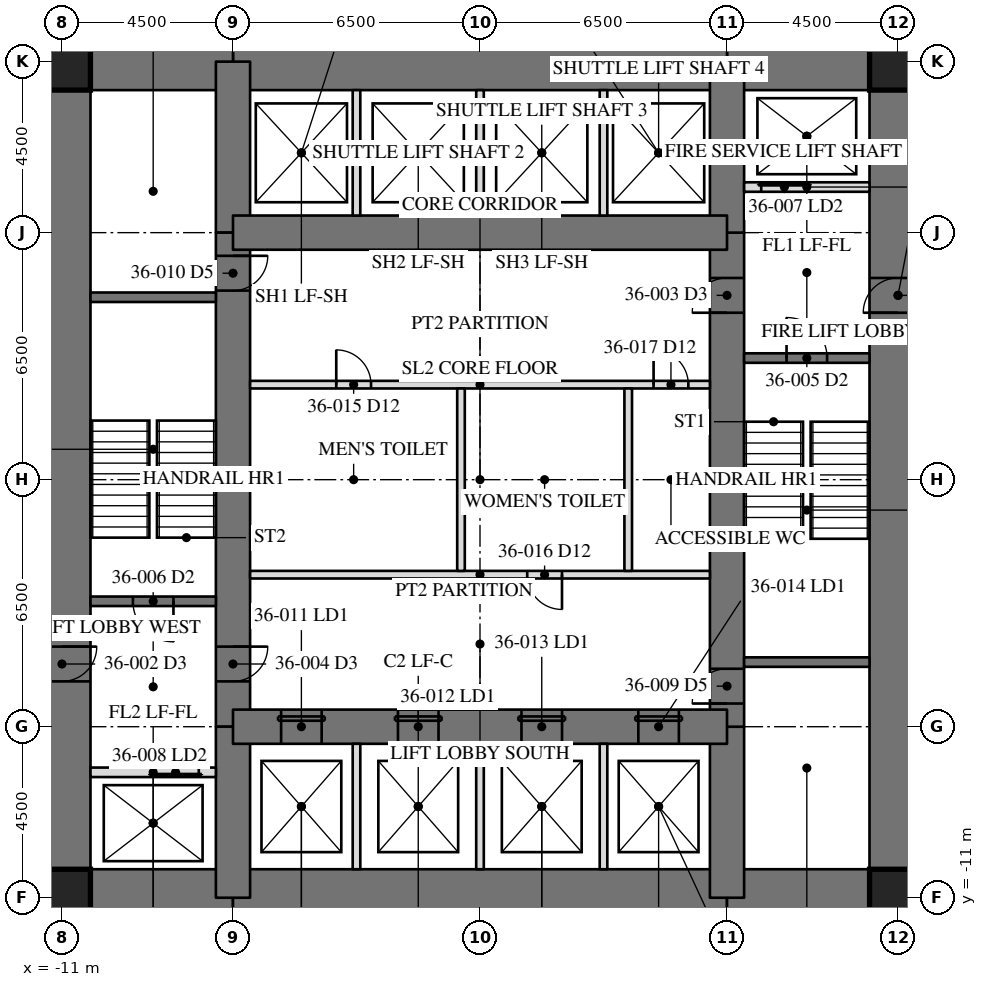
"""IFC4 building model, lengths in metres.
Left out: names, types, materials, properties, quantities, classifications, styles, units other than length and angle.
Written with IfcOpenShell. Run it as: python <this file> out.ifc"""

import sys

from ifc_helpers import new_model, si_unit, direction, frame, frame_2d, origin, origin_2d, place, context, subcontext, project, spatial, rectangle, hollow_rectangle, extrude, element, fill, save


model = new_model("IFC4")
c1 = context("Model", 3, precision=1e-05, world=origin(), true_north=direction((0.0, 1.0)))
c2 = subcontext(c1, "Body", "Model", "MODEL_VIEW")
j1 = project(units=[si_unit("LENGTHUNIT", "METRE"), si_unit("PLANEANGLEUNIT", "RADIAN")], contexts=[c1])
p1 = place(None, origin())
s1 = spatial("IfcSite", under=j1, at=p1, CompositionType="ELEMENT")
p2 = place(p1, origin())
s2 = spatial("IfcBuilding", under=s1, at=p2, CompositionType="ELEMENT")
p3 = place(p2, frame((0.0, 0.0, 154.1)))
s3 = spatial("IfcBuildingStorey", under=s2, at=p3, CompositionType="ELEMENT", Elevation=154.1)
p4 = place(p3, frame((11.0, -11.0, 0.0), z_axis=(0.0, 0.0, 1.0), x_axis=(0.0, 1.0, 0.0)))
e1 = element("IfcWall", 1, at=p4, inside=s3, PredefinedType="SHEAR", context=c2, shape_type="SweptSolid", body=[
    extrude(rectangle(XDim=22.0, YDim=1.5, at=frame_2d((11.0, 0.0))), origin(), (0.0, 0.0, 1.0), 4.1),
])
p5 = place(p4, frame((15.393, 0.0, 0.0)))
e2 = element("IfcOpeningElement", 2, at=p5, cuts=e1, PredefinedType="OPENING", context=c2, shape_type="SweptSolid", body=[
    extrude(rectangle(XDim=0.915, YDim=2.134, at=frame_2d((0.458, 1.067))), frame((0.0, 0.76, 0.0), z_axis=(0.0, -1.0, 0.0), x_axis=(1.0, 0.0, 0.0)), (0.0, 0.0, 1.0), 1.52),
])
p6 = place(p3, frame((-11.0, 11.0, 0.0), z_axis=(0.0, 0.0, 1.0), x_axis=(0.0, -1.0, 0.0)))
e3 = element("IfcWall", 3, at=p6, inside=s3, PredefinedType="SHEAR", context=c2, shape_type="SweptSolid", body=[
    extrude(rectangle(XDim=22.0, YDim=1.5, at=frame_2d((11.0, 0.0))), origin(), (0.0, 0.0, 1.0), 4.1),
])
p7 = place(p6, frame((15.393, 0.0, 0.0)))
e4 = element("IfcOpeningElement", 4, at=p7, cuts=e3, PredefinedType="OPENING", context=c2, shape_type="SweptSolid", body=[
    extrude(rectangle(XDim=0.915, YDim=2.134, at=frame_2d((0.458, 1.067))), frame((0.0, 0.76, 0.0), z_axis=(0.0, -1.0, 0.0), x_axis=(1.0, 0.0, 0.0)), (0.0, 0.0, 1.0), 1.52),
])
p8 = place(p3, frame((11.0, 11.0, 0.0), z_axis=(0.0, 0.0, 1.0), x_axis=(-1.0, 0.0, 0.0)))
e5 = element("IfcWall", 5, at=p8, inside=s3, PredefinedType="SHEAR", context=c2, shape_type="SweptSolid", body=[
    extrude(rectangle(XDim=4.5, YDim=1.5, at=frame_2d((2.25, 0.0))), origin(), (0.0, 0.0, 1.0), 4.1),
])
p9 = place(p3, frame((6.5, 11.0, 0.0), z_axis=(0.0, 0.0, 1.0), x_axis=(-1.0, 0.0, 0.0)))
e6 = element("IfcWall", 6, at=p9, inside=s3, PredefinedType="SHEAR", context=c2, shape_type="SweptSolid", body=[
    extrude(rectangle(XDim=13.0, YDim=1.5, at=frame_2d((6.5, 0.0))), origin(), (0.0, 0.0, 1.0), 4.1),
])
for number, where, z_axis, x_axis in (
    (7, (-6.5, 11.0, 0.0), (0.0, 0.0, 1.0), (-1.0, 0.0, 0.0)),
    (8, (-11.0, -11.0, 0.0), (0.0, 0.0, 1.0), (1.0, 0.0, 0.0)),
):
    element("IfcWall", number, at=place(p3, frame(where, z_axis=z_axis, x_axis=x_axis)), inside=s3, PredefinedType="SHEAR", context=c2, shape_type="SweptSolid", body=[
        extrude(rectangle(XDim=4.5, YDim=1.5, at=frame_2d((2.25, 0.0))), origin(), (0.0, 0.0, 1.0), 4.1),
    ])
p10 = place(p3, frame((-6.5, -11.0, 0.0), z_axis=(0.0, 0.0, 1.0), x_axis=(1.0, 0.0, 0.0)))
e9 = element("IfcWall", 9, at=p10, inside=s3, PredefinedType="SHEAR", context=c2, shape_type="SweptSolid", body=[
    extrude(rectangle(XDim=13.0, YDim=1.5, at=frame_2d((6.5, 0.0))), origin(), (0.0, 0.0, 1.0), 4.1),
])
p11 = place(p3, frame((6.5, -11.0, 0.0), z_axis=(0.0, 0.0, 1.0), x_axis=(1.0, 0.0, 0.0)))
e10 = element("IfcWall", 10, at=p11, inside=s3, PredefinedType="SHEAR", context=c2, shape_type="SweptSolid", body=[
    extrude(rectangle(XDim=4.5, YDim=1.5, at=frame_2d((2.25, 0.0))), origin(), (0.0, 0.0, 1.0), 4.1),
])
p12 = place(p3, frame((6.5, -11.0, 0.0), z_axis=(0.0, 0.0, 1.0), x_axis=(0.0, 1.0, 0.0)))
e11 = element("IfcWall", 11, at=p12, inside=s3, PredefinedType="SHEAR", context=c2, shape_type="SweptSolid", body=[
    extrude(rectangle(XDim=4.5, YDim=0.9, at=frame_2d((2.25, 0.0))), origin(), (0.0, 0.0, 1.0), 4.1),
])
p13 = place(p3, frame((6.5, -6.5, 0.0), z_axis=(0.0, 0.0, 1.0), x_axis=(0.0, 1.0, 0.0)))
e12 = element("IfcWall", 12, at=p13, inside=s3, PredefinedType="SHEAR", context=c2, shape_type="SweptSolid", body=[
    extrude(rectangle(XDim=13.0, YDim=0.9, at=frame_2d((6.5, 0.0))), origin(), (0.0, 0.0, 1.0), 4.1),
])
p14 = place(p13, frame((10.893, 0.0, 0.0)))
e13 = element("IfcOpeningElement", 13, at=p14, cuts=e12, PredefinedType="OPENING", context=c2, shape_type="SweptSolid", body=[
    extrude(rectangle(XDim=0.915, YDim=2.134, at=frame_2d((0.458, 1.067))), frame((0.0, 0.46, 0.0), z_axis=(0.0, -1.0, 0.0), x_axis=(1.0, 0.0, 0.0)), (0.0, 0.0, 1.0), 0.92),
])
p15 = place(p13, frame((0.61, 0.0, 0.0)))
e14 = element("IfcOpeningElement", 14, at=p15, cuts=e12, PredefinedType="OPENING", context=c2, shape_type="SweptSolid", body=[
    extrude(rectangle(XDim=0.915, YDim=2.134, at=frame_2d((0.458, 1.067))), frame((0.0, 0.46, 0.0), z_axis=(0.0, -1.0, 0.0), x_axis=(1.0, 0.0, 0.0)), (0.0, 0.0, 1.0), 0.92),
])
for number, where, z_axis, x_axis in (
    (15, (6.5, 6.5, 0.0), (0.0, 0.0, 1.0), (0.0, 1.0, 0.0)),
    (16, (-6.5, 11.0, 0.0), (0.0, 0.0, 1.0), (0.0, -1.0, 0.0)),
):
    element("IfcWall", number, at=place(p3, frame(where, z_axis=z_axis, x_axis=x_axis)), inside=s3, PredefinedType="SHEAR", context=c2, shape_type="SweptSolid", body=[
        extrude(rectangle(XDim=4.5, YDim=0.9, at=frame_2d((2.25, 0.0))), origin(), (0.0, 0.0, 1.0), 4.1),
    ])
p16 = place(p3, frame((-6.5, 6.5, 0.0), z_axis=(0.0, 0.0, 1.0), x_axis=(0.0, -1.0, 0.0)))
e17 = element("IfcWall", 17, at=p16, inside=s3, PredefinedType="SHEAR", context=c2, shape_type="SweptSolid", body=[
    extrude(rectangle(XDim=13.0, YDim=0.9, at=frame_2d((6.5, 0.0))), origin(), (0.0, 0.0, 1.0), 4.1),
])
p17 = place(p16, frame((10.893, 0.0, 0.0)))
e18 = element("IfcOpeningElement", 18, at=p17, cuts=e17, PredefinedType="OPENING", context=c2, shape_type="SweptSolid", body=[
    extrude(rectangle(XDim=0.915, YDim=2.134, at=frame_2d((0.458, 1.067))), frame((0.0, 0.46, 0.0), z_axis=(0.0, -1.0, 0.0), x_axis=(1.0, 0.0, 0.0)), (0.0, 0.0, 1.0), 0.92),
])
p18 = place(p16, frame((0.61, 0.0, 0.0)))
e19 = element("IfcOpeningElement", 19, at=p18, cuts=e17, PredefinedType="OPENING", context=c2, shape_type="SweptSolid", body=[
    extrude(rectangle(XDim=0.915, YDim=2.134, at=frame_2d((0.458, 1.067))), frame((0.0, 0.46, 0.0), z_axis=(0.0, -1.0, 0.0), x_axis=(1.0, 0.0, 0.0)), (0.0, 0.0, 1.0), 0.92),
])
p19 = place(p3, frame((-6.5, -6.5, 0.0), z_axis=(0.0, 0.0, 1.0), x_axis=(0.0, -1.0, 0.0)))
e20 = element("IfcWall", 20, at=p19, inside=s3, PredefinedType="SHEAR", context=c2, shape_type="SweptSolid", body=[
    extrude(rectangle(XDim=4.5, YDim=0.9, at=frame_2d((2.25, 0.0))), origin(), (0.0, 0.0, 1.0), 4.1),
])
p20 = place(p3, frame((6.5, 6.5, 0.0), z_axis=(0.0, 0.0, 1.0), x_axis=(-1.0, 0.0, 0.0)))
e21 = element("IfcWall", 21, at=p20, inside=s3, PredefinedType="SHEAR", context=c2, shape_type="SweptSolid", body=[
    extrude(rectangle(XDim=13.0, YDim=0.9, at=frame_2d((6.5, 0.0))), origin(), (0.0, 0.0, 1.0), 4.1),
])
p21 = place(p3, frame((-6.5, -6.5, 0.0), z_axis=(0.0, 0.0, 1.0), x_axis=(1.0, 0.0, 0.0)))
e22 = element("IfcWall", 22, at=p21, inside=s3, PredefinedType="SHEAR", context=c2, shape_type="SweptSolid", body=[
    extrude(rectangle(XDim=13.0, YDim=0.9, at=frame_2d((6.5, 0.0))), origin(), (0.0, 0.0, 1.0), 4.1),
])
p22 = place(p21, frame((1.267, 0.0, 0.0)))
e23 = element("IfcOpeningElement", 23, at=p22, cuts=e22, PredefinedType="OPENING", context=c2, shape_type="SweptSolid", body=[
    extrude(rectangle(XDim=1.067, YDim=2.134, at=frame_2d((0.533, 1.067))), frame((0.0, 0.46, 0.0), z_axis=(0.0, -1.0, 0.0), x_axis=(1.0, 0.0, 0.0)), (0.0, 0.0, 1.0), 0.92),
])
p23 = place(p21, frame((4.342, 0.0, 0.0)))
e24 = element("IfcOpeningElement", 24, at=p23, cuts=e22, PredefinedType="OPENING", context=c2, shape_type="SweptSolid", body=[
    extrude(rectangle(XDim=1.067, YDim=2.134, at=frame_2d((0.533, 1.067))), frame((0.0, 0.46, 0.0), z_axis=(0.0, -1.0, 0.0), x_axis=(1.0, 0.0, 0.0)), (0.0, 0.0, 1.0), 0.92),
])
p24 = place(p21, frame((7.592, 0.0, 0.0)))
e25 = element("IfcOpeningElement", 25, at=p24, cuts=e22, PredefinedType="OPENING", context=c2, shape_type="SweptSolid", body=[
    extrude(rectangle(XDim=1.067, YDim=2.134, at=frame_2d((0.533, 1.067))), frame((0.0, 0.46, 0.0), z_axis=(0.0, -1.0, 0.0), x_axis=(1.0, 0.0, 0.0)), (0.0, 0.0, 1.0), 0.92),
])
p25 = place(p21, frame((10.667, 0.0, 0.0)))
e26 = element("IfcOpeningElement", 26, at=p25, cuts=e22, PredefinedType="OPENING", context=c2, shape_type="SweptSolid", body=[
    extrude(rectangle(XDim=1.067, YDim=2.134, at=frame_2d((0.533, 1.067))), frame((0.0, 0.46, 0.0), z_axis=(0.0, -1.0, 0.0), x_axis=(1.0, 0.0, 0.0)), (0.0, 0.0, 1.0), 0.92),
])
for number, where, z_axis, x_axis in (
    (27, (11.0, 11.0, 0.0), (0.0, 0.0, 1.0), (1.0, 0.0, 0.0)),
    (28, (-11.0, 11.0, 0.0), (0.0, 0.0, 1.0), (1.0, 0.0, 0.0)),
    (29, (-11.0, -11.0, 0.0), (0.0, 0.0, 1.0), (1.0, 0.0, 0.0)),
    (30, (11.0, -11.0, 0.0), (0.0, 0.0, 1.0), (1.0, 0.0, 0.0)),
):
    element("IfcColumn", number, at=place(p3, frame(where, z_axis=z_axis, x_axis=x_axis)), inside=s3, PredefinedType="COLUMN", context=c2, shape_type="SweptSolid", body=[
        extrude(hollow_rectangle(XDim=1.499, YDim=1.499, WallThickness=0.102, at=origin_2d()), origin(), (0.0, 0.0, 1.0), 4.1),
    ])
for number, where, z_axis, x_axis in (
    (31, (6.95, -4.8, 0.0), (0.0, 0.0, 1.0), (1.0, 0.0, 0.0)),
    (32, (-6.95, 4.8, 0.0), (0.0, 0.0, 1.0), (-1.0, 0.0, 0.0)),
):
    element("IfcWall", number, at=place(p3, frame(where, z_axis=z_axis, x_axis=x_axis)), inside=s3, PredefinedType="SOLIDWALL", context=c2, shape_type="SweptSolid", body=[
        extrude(rectangle(XDim=3.3, YDim=0.25, at=frame_2d((1.65, 0.0))), origin(), (0.0, 0.0, 1.0), 3.91),
    ])
p26 = place(p3, frame((6.95, 3.2, 0.0), z_axis=(0.0, 0.0, 1.0), x_axis=(1.0, 0.0, 0.0)))
e33 = element("IfcWall", 33, at=p26, inside=s3, PredefinedType="SOLIDWALL", context=c2, shape_type="SweptSolid", body=[
    extrude(rectangle(XDim=3.3, YDim=0.25, at=frame_2d((1.65, 0.0))), origin(), (0.0, 0.0, 1.0), 3.91),
])
p27 = place(p26, frame((1.116, 0.0, 0.0)))
e34 = element("IfcOpeningElement", 34, at=p27, cuts=e33, PredefinedType="OPENING", context=c2, shape_type="SweptSolid", body=[
    extrude(rectangle(XDim=1.067, YDim=2.134, at=frame_2d((0.533, 1.067))), frame((0.0, 0.135, 0.0), z_axis=(0.0, -1.0, 0.0), x_axis=(1.0, 0.0, 0.0)), (0.0, 0.0, 1.0), 0.27),
])
p28 = place(p3, frame((-6.95, -3.2, 0.0), z_axis=(0.0, 0.0, 1.0), x_axis=(-1.0, 0.0, 0.0)))
e35 = element("IfcWall", 35, at=p28, inside=s3, PredefinedType="SOLIDWALL", context=c2, shape_type="SweptSolid", body=[
    extrude(rectangle(XDim=3.3, YDim=0.25, at=frame_2d((1.65, 0.0))), origin(), (0.0, 0.0, 1.0), 3.91),
])
p29 = place(p28, frame((1.116, 0.0, 0.0)))
e36 = element("IfcOpeningElement", 36, at=p29, cuts=e35, PredefinedType="OPENING", context=c2, shape_type="SweptSolid", body=[
    extrude(rectangle(XDim=1.067, YDim=2.134, at=frame_2d((0.533, 1.067))), frame((0.0, 0.135, 0.0), z_axis=(0.0, -1.0, 0.0), x_axis=(1.0, 0.0, 0.0)), (0.0, 0.0, 1.0), 0.27),
])
p30 = place(p3, frame((6.95, 7.7, 0.0), z_axis=(0.0, 0.0, 1.0), x_axis=(1.0, 0.0, 0.0)))
e37 = element("IfcWall", 37, at=p30, inside=s3, PredefinedType="PARTITIONING", context=c2, shape_type="SweptSolid", body=[
    extrude(rectangle(XDim=3.3, YDim=0.25, at=frame_2d((1.65, 0.0))), origin(), (0.0, 0.0, 1.0), 3.91),
])
p31 = place(p30, frame((0.45, 0.0, 0.0)))
e38 = element("IfcOpeningElement", 38, at=p31, cuts=e37, PredefinedType="OPENING", context=c2, shape_type="SweptSolid", body=[
    extrude(rectangle(XDim=1.219, YDim=2.134, at=frame_2d((0.609, 1.067))), frame((0.0, 0.135, 0.0), z_axis=(0.0, -1.0, 0.0), x_axis=(1.0, 0.0, 0.0)), (0.0, 0.0, 1.0), 0.27),
])
p32 = place(p3, frame((-6.95, -7.7, 0.0), z_axis=(0.0, 0.0, 1.0), x_axis=(-1.0, 0.0, 0.0)))
e39 = element("IfcWall", 39, at=p32, inside=s3, PredefinedType="PARTITIONING", context=c2, shape_type="SweptSolid", body=[
    extrude(rectangle(XDim=3.3, YDim=0.25, at=frame_2d((1.65, 0.0))), origin(), (0.0, 0.0, 1.0), 3.91),
])
p33 = place(p32, frame((0.45, 0.0, 0.0)))
e40 = element("IfcOpeningElement", 40, at=p33, cuts=e39, PredefinedType="OPENING", context=c2, shape_type="SweptSolid", body=[
    extrude(rectangle(XDim=1.219, YDim=2.134, at=frame_2d((0.609, 1.067))), frame((0.0, 0.135, 0.0), z_axis=(0.0, -1.0, 0.0), x_axis=(1.0, 0.0, 0.0)), (0.0, 0.0, 1.0), 0.27),
])
p34 = place(p3, frame((-6.05, 2.5, 0.0), z_axis=(0.0, 0.0, 1.0), x_axis=(1.0, 0.0, 0.0)))
e41 = element("IfcWall", 41, at=p34, inside=s3, PredefinedType="PARTITIONING", context=c2, shape_type="SweptSolid", body=[
    extrude(rectangle(XDim=12.1, YDim=0.2, at=frame_2d((6.05, 0.0))), origin(), (0.0, 0.0, 1.0), 3.91),
])
p35 = place(p34, frame((2.268, 0.0, 0.0)))
e42 = element("IfcOpeningElement", 42, at=p35, cuts=e41, PredefinedType="OPENING", context=c2, shape_type="SweptSolid", body=[
    extrude(rectangle(XDim=0.915, YDim=2.134, at=frame_2d((0.458, 1.067))), frame((0.0, 0.11, 0.0), z_axis=(0.0, -1.0, 0.0), x_axis=(1.0, 0.0, 0.0)), (0.0, 0.0, 1.0), 0.22),
])
p36 = place(p34, frame((10.617, 0.0, 0.0)))
e43 = element("IfcOpeningElement", 43, at=p36, cuts=e41, PredefinedType="OPENING", context=c2, shape_type="SweptSolid", body=[
    extrude(rectangle(XDim=0.915, YDim=2.134, at=frame_2d((0.458, 1.067))), frame((0.0, 0.11, 0.0), z_axis=(0.0, -1.0, 0.0), x_axis=(1.0, 0.0, 0.0)), (0.0, 0.0, 1.0), 0.22),
])
p37 = place(p3, frame((6.05, -2.5, 0.0), z_axis=(0.0, 0.0, 1.0), x_axis=(-1.0, 0.0, 0.0)))
e44 = element("IfcWall", 44, at=p37, inside=s3, PredefinedType="PARTITIONING", context=c2, shape_type="SweptSolid", body=[
    extrude(rectangle(XDim=12.1, YDim=0.2, at=frame_2d((6.05, 0.0))), origin(), (0.0, 0.0, 1.0), 3.91),
])
p38 = place(p37, frame((3.893, 0.0, 0.0)))
e45 = element("IfcOpeningElement", 45, at=p38, cuts=e44, PredefinedType="OPENING", context=c2, shape_type="SweptSolid", body=[
    extrude(rectangle(XDim=0.915, YDim=2.134, at=frame_2d((0.458, 1.067))), frame((0.0, 0.11, 0.0), z_axis=(0.0, -1.0, 0.0), x_axis=(1.0, 0.0, 0.0)), (0.0, 0.0, 1.0), 0.22),
])
for number, where, z_axis, x_axis in (
    (46, (-3.25, 6.95, 0.0), (0.0, 0.0, 1.0), (0.0, 1.0, 0.0)),
    (47, (0.0, 6.95, 0.0), (0.0, 0.0, 1.0), (0.0, 1.0, 0.0)),
    (48, (3.25, 6.95, 0.0), (0.0, 0.0, 1.0), (0.0, 1.0, 0.0)),
    (49, (-3.25, -10.25, 0.0), (0.0, 0.0, 1.0), (0.0, 1.0, 0.0)),
    (50, (0.0, -10.25, 0.0), (0.0, 0.0, 1.0), (0.0, 1.0, 0.0)),
    (51, (3.25, -10.25, 0.0), (0.0, 0.0, 1.0), (0.0, 1.0, 0.0)),
):
    element("IfcWall", number, at=place(p3, frame(where, z_axis=z_axis, x_axis=x_axis)), inside=s3, PredefinedType="PARTITIONING", context=c2, shape_type="SweptSolid", body=[
        extrude(rectangle(XDim=3.3, YDim=0.2, at=frame_2d((1.65, 0.0))), origin(), (0.0, 0.0, 1.0), 3.91),
    ])
for number, where, z_axis, x_axis in (
    (52, (-0.5, -2.4, 0.0), (0.0, 0.0, 1.0), (0.0, 1.0, 0.0)),
    (53, (3.9, -2.4, 0.0), (0.0, 0.0, 1.0), (0.0, 1.0, 0.0)),
):
    element("IfcWall", number, at=place(p3, frame(where, z_axis=z_axis, x_axis=x_axis)), inside=s3, PredefinedType="PARTITIONING", context=c2, shape_type="SweptSolid", body=[
        extrude(rectangle(XDim=4.8, YDim=0.2, at=frame_2d((2.4, 0.0))), origin(), (0.0, 0.0, 1.0), 3.91),
    ])
p39 = place(p14, origin())
e54 = element("IfcDoor", 54, at=p39, inside=s3, OperationType="SINGLE_SWING_RIGHT", PredefinedType="DOOR", context=c2, shape_type="SweptSolid", body=[
    extrude(rectangle(XDim=0.915, YDim=2.134, at=frame_2d((0.458, 1.067))), frame((0.0, -0.375, 0.0), z_axis=(0.0, -1.0, 0.0), x_axis=(1.0, 0.0, 0.0)), (0.0, 0.0, 1.0), 0.05),
])
fill(e13, e54)
p40 = place(p17, origin())
e55 = element("IfcDoor", 55, at=p40, inside=s3, OperationType="SINGLE_SWING_RIGHT", PredefinedType="DOOR", context=c2, shape_type="SweptSolid", body=[
    extrude(rectangle(XDim=0.915, YDim=2.134, at=frame_2d((0.458, 1.067))), frame((0.0, -0.375, 0.0), z_axis=(0.0, -1.0, 0.0), x_axis=(1.0, 0.0, 0.0)), (0.0, 0.0, 1.0), 0.05),
])
fill(e18, e55)
p41 = place(p27, origin())
e56 = element("IfcDoor", 56, at=p41, inside=s3, OperationType="SINGLE_SWING_LEFT", PredefinedType="DOOR", context=c2, shape_type="SweptSolid", body=[
    extrude(rectangle(XDim=1.067, YDim=2.134, at=frame_2d((0.533, 1.067))), frame((0.0, 0.025, 0.0), z_axis=(0.0, -1.0, 0.0), x_axis=(1.0, 0.0, 0.0)), (0.0, 0.0, 1.0), 0.05),
])
fill(e34, e56)
p42 = place(p29, origin())
e57 = element("IfcDoor", 57, at=p42, inside=s3, OperationType="SINGLE_SWING_LEFT", PredefinedType="DOOR", context=c2, shape_type="SweptSolid", body=[
    extrude(rectangle(XDim=1.067, YDim=2.134, at=frame_2d((0.533, 1.067))), frame((0.0, 0.025, 0.0), z_axis=(0.0, -1.0, 0.0), x_axis=(1.0, 0.0, 0.0)), (0.0, 0.0, 1.0), 0.05),
])
fill(e36, e57)
p43 = place(p31, origin())
e58 = element("IfcDoor", 58, at=p43, inside=s3, OperationType="SLIDING_TO_LEFT", PredefinedType="DOOR", context=c2, shape_type="SweptSolid", body=[
    extrude(rectangle(XDim=1.219, YDim=2.134, at=frame_2d((0.609, 1.067))), frame((0.0, 0.025, 0.0), z_axis=(0.0, -1.0, 0.0), x_axis=(1.0, 0.0, 0.0)), (0.0, 0.0, 1.0), 0.05),
])
fill(e38, e58)
p44 = place(p33, origin())
e59 = element("IfcDoor", 59, at=p44, inside=s3, OperationType="SLIDING_TO_LEFT", PredefinedType="DOOR", context=c2, shape_type="SweptSolid", body=[
    extrude(rectangle(XDim=1.219, YDim=2.134, at=frame_2d((0.609, 1.067))), frame((0.0, 0.025, 0.0), z_axis=(0.0, -1.0, 0.0), x_axis=(1.0, 0.0, 0.0)), (0.0, 0.0, 1.0), 0.05),
])
fill(e40, e59)
p45 = place(p15, origin())
e60 = element("IfcDoor", 60, at=p45, inside=s3, OperationType="SINGLE_SWING_RIGHT", PredefinedType="DOOR", context=c2, shape_type="SweptSolid", body=[
    extrude(rectangle(XDim=0.915, YDim=2.134, at=frame_2d((0.458, 1.067))), frame((0.0, -0.375, 0.0), z_axis=(0.0, -1.0, 0.0), x_axis=(1.0, 0.0, 0.0)), (0.0, 0.0, 1.0), 0.05),
])
fill(e14, e60)
p46 = place(p18, origin())
e61 = element("IfcDoor", 61, at=p46, inside=s3, OperationType="SINGLE_SWING_RIGHT", PredefinedType="DOOR", context=c2, shape_type="SweptSolid", body=[
    extrude(rectangle(XDim=0.915, YDim=2.134, at=frame_2d((0.458, 1.067))), frame((0.0, -0.375, 0.0), z_axis=(0.0, -1.0, 0.0), x_axis=(1.0, 0.0, 0.0)), (0.0, 0.0, 1.0), 0.05),
])
fill(e19, e61)
p47 = place(p22, origin())
e62 = element("IfcDoor", 62, at=p47, inside=s3, OperationType="SLIDING_TO_LEFT", PredefinedType="DOOR", context=c2, shape_type="SweptSolid", body=[
    extrude(rectangle(XDim=1.067, YDim=2.134, at=frame_2d((0.533, 1.067))), frame((0.0, -0.375, 0.0), z_axis=(0.0, -1.0, 0.0), x_axis=(1.0, 0.0, 0.0)), (0.0, 0.0, 1.0), 0.05),
])
fill(e23, e62)
p48 = place(p23, origin())
e63 = element("IfcDoor", 63, at=p48, inside=s3, OperationType="SLIDING_TO_LEFT", PredefinedType="DOOR", context=c2, shape_type="SweptSolid", body=[
    extrude(rectangle(XDim=1.067, YDim=2.134, at=frame_2d((0.533, 1.067))), frame((0.0, -0.375, 0.0), z_axis=(0.0, -1.0, 0.0), x_axis=(1.0, 0.0, 0.0)), (0.0, 0.0, 1.0), 0.05),
])
fill(e24, e63)
p49 = place(p24, origin())
e64 = element("IfcDoor", 64, at=p49, inside=s3, OperationType="SLIDING_TO_LEFT", PredefinedType="DOOR", context=c2, shape_type="SweptSolid", body=[
    extrude(rectangle(XDim=1.067, YDim=2.134, at=frame_2d((0.533, 1.067))), frame((0.0, -0.375, 0.0), z_axis=(0.0, -1.0, 0.0), x_axis=(1.0, 0.0, 0.0)), (0.0, 0.0, 1.0), 0.05),
])
fill(e25, e64)
p50 = place(p25, origin())
e65 = element("IfcDoor", 65, at=p50, inside=s3, OperationType="SLIDING_TO_LEFT", PredefinedType="DOOR", context=c2, shape_type="SweptSolid", body=[
    extrude(rectangle(XDim=1.067, YDim=2.134, at=frame_2d((0.533, 1.067))), frame((0.0, -0.375, 0.0), z_axis=(0.0, -1.0, 0.0), x_axis=(1.0, 0.0, 0.0)), (0.0, 0.0, 1.0), 0.05),
])
fill(e26, e65)
p51 = place(p35, origin())
e66 = element("IfcDoor", 66, at=p51, inside=s3, OperationType="SINGLE_SWING_LEFT", PredefinedType="DOOR", context=c2, shape_type="SweptSolid", body=[
    extrude(rectangle(XDim=0.915, YDim=2.134, at=frame_2d((0.458, 1.067))), frame((0.0, 0.025, 0.0), z_axis=(0.0, -1.0, 0.0), x_axis=(1.0, 0.0, 0.0)), (0.0, 0.0, 1.0), 0.05),
])
fill(e42, e66)
p52 = place(p38, origin())
e67 = element("IfcDoor", 67, at=p52, inside=s3, OperationType="SINGLE_SWING_LEFT", PredefinedType="DOOR", context=c2, shape_type="SweptSolid", body=[
    extrude(rectangle(XDim=0.915, YDim=2.134, at=frame_2d((0.458, 1.067))), frame((0.0, 0.025, 0.0), z_axis=(0.0, -1.0, 0.0), x_axis=(1.0, 0.0, 0.0)), (0.0, 0.0, 1.0), 0.05),
])
fill(e45, e67)
p53 = place(p36, origin())
e68 = element("IfcDoor", 68, at=p53, inside=s3, OperationType="SINGLE_SWING_LEFT", PredefinedType="DOOR", context=c2, shape_type="SweptSolid", body=[
    extrude(rectangle(XDim=0.915, YDim=2.134, at=frame_2d((0.458, 1.067))), frame((0.0, 0.025, 0.0), z_axis=(0.0, -1.0, 0.0), x_axis=(1.0, 0.0, 0.0)), (0.0, 0.0, 1.0), 0.05),
])
fill(e43, e68)
save(model, sys.argv[1])
